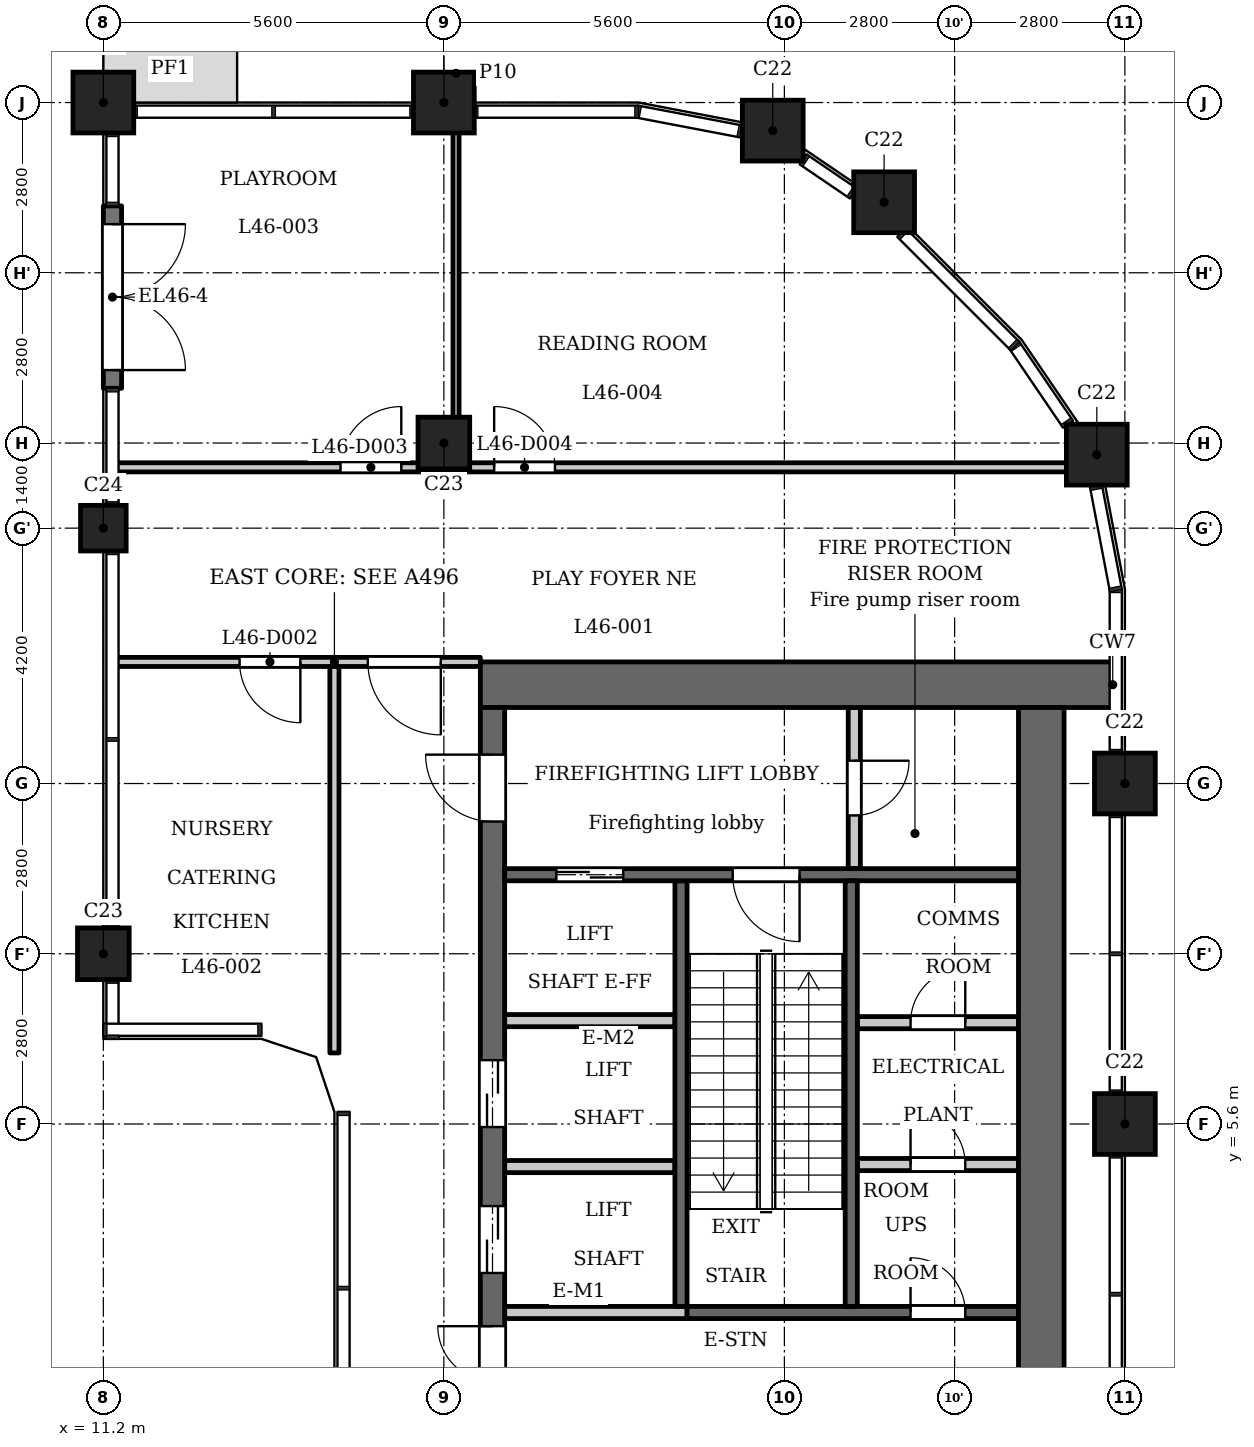
"""IFC4 building model, lengths in metres.
Left out: names, types, materials, properties, quantities, classifications, styles, units other than length and angle.
Written with IfcOpenShell. Run it as: python <this file> out.ifc"""

import sys

from ifc_helpers import new_model, si_unit, direction, frame, frame_2d, origin, origin_2d, place, context, subcontext, project, spatial, polyline, rectangle, outline, extrude, element, fill, save


model = new_model("IFC4")
c1 = context("Model", 3, precision=1e-05, world=origin(), true_north=direction((0.0, 1.0)))
c2 = subcontext(c1, "Body", "Model", "MODEL_VIEW")
j1 = project(units=[si_unit("LENGTHUNIT", "METRE"), si_unit("PLANEANGLEUNIT", "RADIAN")], contexts=[c1])
p1 = place(None, origin())
s1 = spatial("IfcSite", under=j1, at=p1, CompositionType="ELEMENT")
p2 = place(p1, origin())
s2 = spatial("IfcBuilding", under=s1, at=p2, CompositionType="ELEMENT")
p3 = place(p2, frame((0.0, 0.0, 178.1)))
s3 = spatial("IfcBuildingStorey", under=s2, at=p3, CompositionType="ELEMENT", Elevation=178.1)
for number, where, z_axis, x_axis in (
    (1, (28.0, 5.6, 0.0), (0.0, 0.0, 1.0), (1.0, 0.0, 0.0)),
    (2, (28.0, 11.2, 0.0), (0.0, 0.0, 1.0), (1.0, 0.0, 0.0)),
    (3, (27.538, 16.609, 0.0), (0.0, 0.0, 1.0), (1.0, 0.0, 0.0)),
    (4, (24.04, 20.76, 0.0), (0.0, 0.0, 1.0), (1.0, 0.0, 0.0)),
    (5, (22.209, 21.938, 0.0), (0.0, 0.0, 1.0), (1.0, 0.0, 0.0)),
    (6, (16.8, 22.4, 0.0), (0.0, 0.0, 1.0), (1.0, 0.0, 0.0)),
    (7, (11.2, 22.4, 0.0), (0.0, 0.0, 1.0), (1.0, 0.0, 0.0)),
):
    element("IfcColumn", number, at=place(p3, frame(where, z_axis=z_axis, x_axis=x_axis)), inside=s3, PredefinedType="COLUMN", context=c2, shape_type="SweptSolid", body=[
        extrude(rectangle(XDim=1.0, YDim=1.0, at=origin_2d()), origin(), (0.0, 0.0, 1.0), 5.4),
    ])
for number, where, z_axis, x_axis in (
    (8, (16.8, 16.8, 0.0), (0.0, 0.0, 1.0), (1.0, 0.0, 0.0)),
    (9, (11.2, 8.4, 0.0), (0.0, 0.0, 1.0), (1.0, 0.0, 0.0)),
):
    element("IfcColumn", number, at=place(p3, frame(where, z_axis=z_axis, x_axis=x_axis)), inside=s3, PredefinedType="COLUMN", context=c2, shape_type="SweptSolid", body=[
        extrude(rectangle(XDim=0.85, YDim=0.85, at=origin_2d()), origin(), (0.0, 0.0, 1.0), 5.4),
    ])
p4 = place(p3, frame((11.2, 15.4, 0.0), z_axis=(0.0, 0.0, 1.0), x_axis=(1.0, 0.0, 0.0)))
e10 = element("IfcColumn", 10, at=p4, inside=s3, PredefinedType="COLUMN", context=c2, shape_type="SweptSolid", body=[
    extrude(rectangle(XDim=0.75, YDim=0.75, at=origin_2d()), origin(), (0.0, 0.0, 1.0), 5.4),
])
p5 = place(p3, frame((11.35, 20.7, 0.0), z_axis=(0.0, 0.0, 1.0), x_axis=(0.0, -1.0, 0.0)))
e11 = element("IfcWall", 11, at=p5, inside=s3, PredefinedType="SOLIDWALL", context=c2, shape_type="SweptSolid", body=[
    extrude(rectangle(XDim=3.0, YDim=0.3, at=frame_2d((1.5, 0.0))), origin(), (0.0, 0.0, 1.0), 4.95),
])
p6 = place(p5, frame((0.3, 0.0, 0.0)))
e12 = element("IfcOpeningElement", 12, at=p6, cuts=e11, PredefinedType="OPENING", context=c2, shape_type="SweptSolid", body=[
    extrude(rectangle(XDim=2.4, YDim=2.3, at=frame_2d((1.2, 1.15))), frame((0.0, 0.16, 0.0), z_axis=(0.0, -1.0, 0.0), x_axis=(1.0, 0.0, 0.0)), (0.0, 0.0, 1.0), 0.32),
])
p7 = place(p3, frame((20.7, 2.6, 0.0), z_axis=(0.0, 0.0, 1.0), x_axis=(0.0, 1.0, 0.0)))
e13 = element("IfcWall", 13, at=p7, inside=s3, PredefinedType="SHEAR", context=c2, shape_type="SweptSolid", body=[
    extrude(rectangle(XDim=7.0, YDim=0.2, at=frame_2d((3.5, 0.0))), origin(), (0.0, 0.0, 1.0), 4.95),
])
p8 = place(p3, frame((20.8, 2.5, 0.0), z_axis=(0.0, 0.0, 1.0), x_axis=(1.0, 0.0, 0.0)))
e14 = element("IfcWall", 14, at=p8, inside=s3, PredefinedType="SHEAR", context=c2, shape_type="SweptSolid", body=[
    extrude(rectangle(XDim=5.45, YDim=0.2, at=frame_2d((2.725, 0.0))), origin(), (0.0, 0.0, 1.0), 4.95),
])
p9 = place(p8, frame((3.675, 0.0, 0.0)))
e15 = element("IfcOpeningElement", 15, at=p9, cuts=e14, PredefinedType="OPENING", context=c2, shape_type="SweptSolid", body=[
    extrude(rectangle(XDim=0.9, YDim=2.1, at=frame_2d((0.45, 1.05))), frame((0.0, 0.11, 0.0), z_axis=(0.0, -1.0, 0.0), x_axis=(1.0, 0.0, 0.0)), (0.0, 0.0, 1.0), 0.22),
])
p10 = place(p3, frame((17.4, 12.825, 0.0), z_axis=(0.0, 0.0, 1.0), x_axis=(1.0, 0.0, 0.0)))
e16 = element("IfcWall", 16, at=p10, inside=s3, PredefinedType="SHEAR", context=c2, shape_type="SweptSolid", body=[
    extrude(rectangle(XDim=10.4, YDim=0.75, at=frame_2d((5.2, 0.0))), origin(), (0.0, 0.0, 1.0), 4.95),
])
p11 = place(p3, frame((17.6, -12.45, 0.0), z_axis=(0.0, 0.0, 1.0), x_axis=(0.0, 1.0, 0.0)))
e17 = element("IfcWall", 17, at=p11, inside=s3, PredefinedType="SHEAR", context=c2, shape_type="SweptSolid", body=[
    extrude(rectangle(XDim=24.9, YDim=0.4, at=frame_2d((12.45, 0.0))), origin(), (0.0, 0.0, 1.0), 4.95),
])
p12 = place(p11, frame((6.85, 0.0, 0.0)))
e18 = element("IfcOpeningElement", 18, at=p12, cuts=e17, PredefinedType="OPENING", context=c2, shape_type="SweptSolid", body=[
    extrude(rectangle(XDim=0.9, YDim=2.1, at=frame_2d((0.45, 1.05))), frame((0.0, 0.21, 0.0), z_axis=(0.0, -1.0, 0.0), x_axis=(1.0, 0.0, 0.0)), (0.0, 0.0, 1.0), 0.42),
])
p13 = place(p11, frame((10.45, 0.0, 0.0)))
e19 = element("IfcOpeningElement", 19, at=p13, cuts=e17, PredefinedType="OPENING", context=c2, shape_type="SweptSolid", body=[
    extrude(rectangle(XDim=0.9, YDim=2.1, at=frame_2d((0.45, 1.05))), frame((0.0, 0.21, 0.0), z_axis=(0.0, -1.0, 0.0), x_axis=(1.0, 0.0, 0.0)), (0.0, 0.0, 1.0), 0.42),
])
p14 = place(p11, frame((15.6, 0.0, 0.0)))
e20 = element("IfcOpeningElement", 20, at=p14, cuts=e17, PredefinedType="OPENING", context=c2, shape_type="SweptSolid", body=[
    extrude(rectangle(XDim=1.1, YDim=2.1, at=frame_2d((0.55, 1.05))), frame((0.0, 0.21, 0.0), z_axis=(0.0, -1.0, 0.0), x_axis=(1.0, 0.0, 0.0)), (0.0, 0.0, 1.0), 0.42),
])
p15 = place(p11, frame((18.0, 0.0, 0.0)))
e21 = element("IfcOpeningElement", 21, at=p15, cuts=e17, PredefinedType="OPENING", context=c2, shape_type="SweptSolid", body=[
    extrude(rectangle(XDim=1.1, YDim=2.1, at=frame_2d((0.55, 1.05))), frame((0.0, 0.21, 0.0), z_axis=(0.0, -1.0, 0.0), x_axis=(1.0, 0.0, 0.0)), (0.0, 0.0, 1.0), 0.42),
])
p16 = place(p11, frame((23.025, 0.0, 0.0)))
e22 = element("IfcOpeningElement", 22, at=p16, cuts=e17, PredefinedType="OPENING", context=c2, shape_type="SweptSolid", body=[
    extrude(rectangle(XDim=1.1, YDim=2.1, at=frame_2d((0.55, 1.05))), frame((0.0, 0.21, 0.0), z_axis=(0.0, -1.0, 0.0), x_axis=(1.0, 0.0, 0.0)), (0.0, 0.0, 1.0), 0.42),
])
p17 = place(p11, frame((0.775, 0.0, 0.0)))
e23 = element("IfcOpeningElement", 23, at=p17, cuts=e17, PredefinedType="OPENING", context=c2, shape_type="SweptSolid", body=[
    extrude(rectangle(XDim=1.1, YDim=2.1, at=frame_2d((0.55, 1.05))), frame((0.0, 0.21, 0.0), z_axis=(0.0, -1.0, 0.0), x_axis=(1.0, 0.0, 0.0)), (0.0, 0.0, 1.0), 0.42),
])
p18 = place(p11, frame((12.925, 0.0, 0.0)))
e24 = element("IfcOpeningElement", 24, at=p18, cuts=e17, PredefinedType="OPENING", context=c2, shape_type="SweptSolid", body=[
    extrude(rectangle(XDim=1.8, YDim=2.1, at=frame_2d((0.9, 1.05))), frame((0.0, 0.21, 0.0), z_axis=(0.0, -1.0, 0.0), x_axis=(1.0, 0.0, 0.0)), (0.0, 0.0, 1.0), 0.42),
])
p19 = place(p3, frame((26.625, -12.45, 0.0), z_axis=(0.0, 0.0, 1.0), x_axis=(0.0, 1.0, 0.0)))
e25 = element("IfcWall", 25, at=p19, inside=s3, PredefinedType="SHEAR", context=c2, shape_type="SweptSolid", body=[
    extrude(rectangle(XDim=24.9, YDim=0.75, at=frame_2d((12.45, 0.0))), origin(), (0.0, 0.0, 1.0), 4.95),
])
p20 = place(p3, frame((23.55, 9.8, 0.0), z_axis=(0.0, 0.0, 1.0), x_axis=(0.0, 1.0, 0.0)))
e26 = element("IfcWall", 26, at=p20, inside=s3, PredefinedType="PARTITIONING", context=c2, shape_type="SweptSolid", body=[
    extrude(rectangle(XDim=2.65, YDim=0.2, at=frame_2d((1.325, 0.0))), origin(), (0.0, 0.0, 1.0), 4.95),
])
p21 = place(p20, frame((0.875, 0.0, 0.0)))
e27 = element("IfcOpeningElement", 27, at=p21, cuts=e26, PredefinedType="OPENING", context=c2, shape_type="SweptSolid", body=[
    extrude(rectangle(XDim=0.9, YDim=2.1, at=frame_2d((0.45, 1.05))), frame((0.0, 0.11, 0.0), z_axis=(0.0, -1.0, 0.0), x_axis=(1.0, 0.0, 0.0)), (0.0, 0.0, 1.0), 0.22),
])
p22 = place(p3, frame((23.6, 4.933, 0.0), z_axis=(0.0, 0.0, 1.0), x_axis=(1.0, 0.0, 0.0)))
e28 = element("IfcWall", 28, at=p22, inside=s3, PredefinedType="PARTITIONING", context=c2, shape_type="SweptSolid", body=[
    extrude(rectangle(XDim=2.65, YDim=0.2, at=frame_2d((1.325, 0.0))), origin(), (0.0, 0.0, 1.0), 4.95),
])
p23 = place(p22, frame((0.875, 0.0, 0.0)))
e29 = element("IfcOpeningElement", 29, at=p23, cuts=e28, PredefinedType="OPENING", context=c2, shape_type="SweptSolid", body=[
    extrude(rectangle(XDim=0.9, YDim=2.1, at=frame_2d((0.45, 1.05))), frame((0.0, 0.11, 0.0), z_axis=(0.0, -1.0, 0.0), x_axis=(1.0, 0.0, 0.0)), (0.0, 0.0, 1.0), 0.22),
])
p24 = place(p3, frame((23.6, 7.267, 0.0), z_axis=(0.0, 0.0, 1.0), x_axis=(1.0, 0.0, 0.0)))
e30 = element("IfcWall", 30, at=p24, inside=s3, PredefinedType="PARTITIONING", context=c2, shape_type="SweptSolid", body=[
    extrude(rectangle(XDim=2.65, YDim=0.2, at=frame_2d((1.325, 0.0))), origin(), (0.0, 0.0, 1.0), 4.95),
])
p25 = place(p24, frame((0.875, 0.0, 0.0)))
e31 = element("IfcOpeningElement", 31, at=p25, cuts=e30, PredefinedType="OPENING", context=c2, shape_type="SweptSolid", body=[
    extrude(rectangle(XDim=0.9, YDim=2.1, at=frame_2d((0.45, 1.05))), frame((0.0, 0.11, 0.0), z_axis=(0.0, -1.0, 0.0), x_axis=(1.0, 0.0, 0.0)), (0.0, 0.0, 1.0), 0.22),
])
p26 = place(p3, frame((17.8, 2.5, 0.0), z_axis=(0.0, 0.0, 1.0), x_axis=(1.0, 0.0, 0.0)))
e32 = element("IfcWall", 32, at=p26, inside=s3, PredefinedType="PARTITIONING", context=c2, shape_type="SweptSolid", body=[
    extrude(rectangle(XDim=3.0, YDim=0.2, at=frame_2d((1.5, 0.0))), origin(), (0.0, 0.0, 1.0), 4.95),
])
for number, where, z_axis, x_axis in (
    (33, (17.8, 4.9, 0.0), (0.0, 0.0, 1.0), (1.0, 0.0, 0.0)),
    (34, (17.8, 7.3, 0.0), (0.0, 0.0, 1.0), (1.0, 0.0, 0.0)),
):
    element("IfcWall", number, at=place(p3, frame(where, z_axis=z_axis, x_axis=x_axis)), inside=s3, PredefinedType="PARTITIONING", context=c2, shape_type="SweptSolid", body=[
        extrude(rectangle(XDim=2.8, YDim=0.2, at=frame_2d((1.4, 0.0))), origin(), (0.0, 0.0, 1.0), 4.95),
    ])
p27 = place(p3, frame((17.8, 9.7, 0.0), z_axis=(0.0, 0.0, 1.0), x_axis=(1.0, 0.0, 0.0)))
e35 = element("IfcWall", 35, at=p27, inside=s3, PredefinedType="SHEAR", context=c2, shape_type="SweptSolid", body=[
    extrude(rectangle(XDim=8.45, YDim=0.2, at=frame_2d((4.225, 0.0))), origin(), (0.0, 0.0, 1.0), 4.95),
])
p28 = place(p27, frame((0.85, 0.0, 0.0)))
e36 = element("IfcOpeningElement", 36, at=p28, cuts=e35, PredefinedType="OPENING", context=c2, shape_type="SweptSolid", body=[
    extrude(rectangle(XDim=1.1, YDim=2.1, at=frame_2d((0.55, 1.05))), frame((0.0, 0.11, 0.0), z_axis=(0.0, -1.0, 0.0), x_axis=(1.0, 0.0, 0.0)), (0.0, 0.0, 1.0), 0.22),
])
p29 = place(p27, frame((3.75, 0.0, 0.0)))
e37 = element("IfcOpeningElement", 37, at=p29, cuts=e35, PredefinedType="OPENING", context=c2, shape_type="SweptSolid", body=[
    extrude(rectangle(XDim=1.1, YDim=2.1, at=frame_2d((0.55, 1.05))), frame((0.0, 0.11, 0.0), z_axis=(0.0, -1.0, 0.0), x_axis=(1.0, 0.0, 0.0)), (0.0, 0.0, 1.0), 0.22),
])
p30 = place(p3, frame((23.5, 2.6, 0.0), z_axis=(0.0, 0.0, 1.0), x_axis=(0.0, 1.0, 0.0)))
e38 = element("IfcWall", 38, at=p30, inside=s3, PredefinedType="SHEAR", context=c2, shape_type="SweptSolid", body=[
    extrude(rectangle(XDim=7.0, YDim=0.2, at=frame_2d((3.5, 0.0))), origin(), (0.0, 0.0, 1.0), 4.95),
])
p31 = place(p3, frame((11.384, 13.2, 0.0), z_axis=(0.0, 0.0, 1.0), x_axis=(1.0, 0.0, 0.0)))
e39 = element("IfcWall", 39, at=p31, inside=s3, PredefinedType="PARTITIONING", context=c2, shape_type="SweptSolid", body=[
    extrude(rectangle(XDim=6.016, YDim=0.15, at=frame_2d((3.008, 0.0))), origin(), (0.0, 0.0, 1.0), 4.95),
])
p32 = place(p31, frame((4.166, 0.0, 0.0)))
e40 = element("IfcOpeningElement", 40, at=p32, cuts=e39, PredefinedType="OPENING", context=c2, shape_type="SweptSolid", body=[
    extrude(rectangle(XDim=1.2, YDim=2.1, at=frame_2d((0.6, 1.05))), frame((0.0, 0.085, 0.0), z_axis=(0.0, -1.0, 0.0), x_axis=(1.0, 0.0, 0.0)), (0.0, 0.0, 1.0), 0.17),
])
p33 = place(p31, frame((2.056, 0.0, 0.0)))
e41 = element("IfcOpeningElement", 41, at=p33, cuts=e39, PredefinedType="OPENING", context=c2, shape_type="SweptSolid", body=[
    extrude(rectangle(XDim=1.0, YDim=2.1, at=frame_2d((0.5, 1.05))), frame((0.0, 0.085, 0.0), z_axis=(0.0, -1.0, 0.0), x_axis=(1.0, 0.0, 0.0)), (0.0, 0.0, 1.0), 0.17),
])
p34 = place(p3, frame((11.384, 16.4, 0.0), z_axis=(0.0, 0.0, 1.0), x_axis=(1.0, 0.0, 0.0)))
e42 = element("IfcWall", 42, at=p34, inside=s3, PredefinedType="PARTITIONING", context=c2, shape_type="SweptSolid", body=[
    extrude(rectangle(XDim=16.136, YDim=0.15, at=frame_2d((8.068, 0.0))), origin(), (0.0, 0.0, 1.0), 4.95),
])
p35 = place(p34, frame((3.716, 0.0, 0.0)))
e43 = element("IfcOpeningElement", 43, at=p35, cuts=e42, PredefinedType="OPENING", context=c2, shape_type="SweptSolid", body=[
    extrude(rectangle(XDim=1.0, YDim=2.1, at=frame_2d((0.5, 1.05))), frame((0.0, 0.085, 0.0), z_axis=(0.0, -1.0, 0.0), x_axis=(1.0, 0.0, 0.0)), (0.0, 0.0, 1.0), 0.17),
])
p36 = place(p34, frame((6.243, 0.0, 0.0)))
e44 = element("IfcOpeningElement", 44, at=p36, cuts=e42, PredefinedType="OPENING", context=c2, shape_type="SweptSolid", body=[
    extrude(rectangle(XDim=1.0, YDim=2.1, at=frame_2d((0.5, 1.05))), frame((0.0, 0.085, 0.0), z_axis=(0.0, -1.0, 0.0), x_axis=(1.0, 0.0, 0.0)), (0.0, 0.0, 1.0), 0.17),
])
p37 = place(p3, frame((15.0, 6.769, 0.0), z_axis=(0.0, 0.0, 1.0), x_axis=(0.0, 1.0, 0.0)))
e45 = element("IfcWall", 45, at=p37, inside=s3, PredefinedType="PARTITIONING", context=c2, shape_type="SweptSolid", body=[
    extrude(rectangle(XDim=6.356, YDim=0.15, at=frame_2d((3.178, 0.0))), origin(), (0.0, 0.0, 1.0), 4.95),
])
p38 = place(p3, frame((17.0, 16.475, 0.0), z_axis=(0.0, 0.0, 1.0), x_axis=(0.0, 1.0, 0.0)))
e46 = element("IfcWall", 46, at=p38, inside=s3, PredefinedType="PARTITIONING", context=c2, shape_type="SweptSolid", body=[
    extrude(rectangle(XDim=6.405, YDim=0.1, at=frame_2d((3.202, 0.0))), origin(), (0.0, 0.0, 1.0), 4.95),
])
p39 = place(p3, origin())
e47 = element("IfcWall", 47, at=p39, inside=s3, PredefinedType="SOLIDWALL", context=c2, shape_type="SweptSolid", body=[
    extrude(outline(polyline([(13.8, 7.0), (14.7, 6.7), (15.0, 5.8), (15.3, 5.8), (15.3, 5.849), (14.937, 6.937), (13.849, 7.3), (13.8, 7.3), (13.8, 7.0)])), origin(), (0.0, 0.0, 1.0), 4.95),
])
p40 = place(p6, origin())
e48 = element("IfcDoor", 48, at=p40, inside=s3, OperationType="SINGLE_SWING_LEFT", PredefinedType="DOOR", context=c2, shape_type="SweptSolid", body=[
    extrude(rectangle(XDim=2.4, YDim=2.3, at=frame_2d((1.2, 1.15))), frame((0.0, 0.025, 0.0), z_axis=(0.0, -1.0, 0.0), x_axis=(1.0, 0.0, 0.0)), (0.0, 0.0, 1.0), 0.05),
])
fill(e12, e48)
p41 = place(p14, origin())
e49 = element("IfcDoor", 49, at=p41, inside=s3, OperationType="DOUBLE_DOOR_SLIDING", PredefinedType="DOOR", context=c2, shape_type="SweptSolid", body=[
    extrude(rectangle(XDim=1.1, YDim=2.1, at=frame_2d((0.55, 1.05))), frame((0.0, 0.025, 0.0), z_axis=(0.0, -1.0, 0.0), x_axis=(1.0, 0.0, 0.0)), (0.0, 0.0, 1.0), 0.05),
])
fill(e20, e49)
p42 = place(p15, origin())
e50 = element("IfcDoor", 50, at=p42, inside=s3, OperationType="DOUBLE_DOOR_SLIDING", PredefinedType="DOOR", context=c2, shape_type="SweptSolid", body=[
    extrude(rectangle(XDim=1.1, YDim=2.1, at=frame_2d((0.55, 1.05))), frame((0.0, 0.025, 0.0), z_axis=(0.0, -1.0, 0.0), x_axis=(1.0, 0.0, 0.0)), (0.0, 0.0, 1.0), 0.05),
])
fill(e21, e50)
p43 = place(p28, origin())
e51 = element("IfcDoor", 51, at=p43, inside=s3, OperationType="DOUBLE_DOOR_SLIDING", PredefinedType="DOOR", context=c2, shape_type="SweptSolid", body=[
    extrude(rectangle(XDim=1.1, YDim=2.1, at=frame_2d((0.55, 1.05))), frame((0.0, 0.025, 0.0), z_axis=(0.0, -1.0, 0.0), x_axis=(1.0, 0.0, 0.0)), (0.0, 0.0, 1.0), 0.05),
])
fill(e36, e51)
p44 = place(p16, origin())
e52 = element("IfcDoor", 52, at=p44, inside=s3, OperationType="SINGLE_SWING_LEFT", PredefinedType="DOOR", context=c2, shape_type="SweptSolid", body=[
    extrude(rectangle(XDim=1.1, YDim=2.1, at=frame_2d((0.55, 1.05))), frame((0.0, 0.025, 0.0), z_axis=(0.0, -1.0, 0.0), x_axis=(1.0, 0.0, 0.0)), (0.0, 0.0, 1.0), 0.05),
])
fill(e22, e52)
p45 = place(p21, origin())
e53 = element("IfcDoor", 53, at=p45, inside=s3, OperationType="SINGLE_SWING_RIGHT", PredefinedType="DOOR", context=c2, shape_type="SweptSolid", body=[
    extrude(rectangle(XDim=0.9, YDim=2.1, at=frame_2d((0.45, 1.05))), frame((0.0, 0.025, 0.0), z_axis=(0.0, -1.0, 0.0), x_axis=(1.0, 0.0, 0.0)), (0.0, 0.0, 1.0), 0.05),
])
fill(e27, e53)
p46 = place(p29, origin())
e54 = element("IfcDoor", 54, at=p46, inside=s3, OperationType="SINGLE_SWING_RIGHT", PredefinedType="DOOR", context=c2, shape_type="SweptSolid", body=[
    extrude(rectangle(XDim=1.1, YDim=2.1, at=frame_2d((0.55, 1.05))), frame((0.0, 0.025, 0.0), z_axis=(0.0, -1.0, 0.0), x_axis=(1.0, 0.0, 0.0)), (0.0, 0.0, 1.0), 0.05),
])
fill(e37, e54)
p47 = place(p18, origin())
e55 = element("IfcDoor", 55, at=p47, inside=s3, OperationType="DOUBLE_DOOR_SINGLE_SWING", PredefinedType="DOOR", context=c2, shape_type="SweptSolid", body=[
    extrude(rectangle(XDim=1.8, YDim=2.1, at=frame_2d((0.9, 1.05))), frame((0.0, 0.025, 0.0), z_axis=(0.0, -1.0, 0.0), x_axis=(1.0, 0.0, 0.0)), (0.0, 0.0, 1.0), 0.05),
])
fill(e24, e55)
p48 = place(p23, origin())
e56 = element("IfcDoor", 56, at=p48, inside=s3, OperationType="SINGLE_SWING_RIGHT", PredefinedType="DOOR", context=c2, shape_type="SweptSolid", body=[
    extrude(rectangle(XDim=0.9, YDim=2.1, at=frame_2d((0.45, 1.05))), frame((0.0, 0.025, 0.0), z_axis=(0.0, -1.0, 0.0), x_axis=(1.0, 0.0, 0.0)), (0.0, 0.0, 1.0), 0.05),
])
fill(e29, e56)
p49 = place(p25, origin())
e57 = element("IfcDoor", 57, at=p49, inside=s3, OperationType="SINGLE_SWING_LEFT", PredefinedType="DOOR", context=c2, shape_type="SweptSolid", body=[
    extrude(rectangle(XDim=0.9, YDim=2.1, at=frame_2d((0.45, 1.05))), frame((0.0, 0.025, 0.0), z_axis=(0.0, -1.0, 0.0), x_axis=(1.0, 0.0, 0.0)), (0.0, 0.0, 1.0), 0.05),
])
fill(e31, e57)
p50 = place(p9, origin())
e58 = element("IfcDoor", 58, at=p50, inside=s3, OperationType="SINGLE_SWING_RIGHT", PredefinedType="DOOR", context=c2, shape_type="SweptSolid", body=[
    extrude(rectangle(XDim=0.9, YDim=2.1, at=frame_2d((0.45, 1.05))), frame((0.0, 0.025, 0.0), z_axis=(0.0, -1.0, 0.0), x_axis=(1.0, 0.0, 0.0)), (0.0, 0.0, 1.0), 0.05),
])
fill(e15, e58)
p51 = place(p32, origin())
e59 = element("IfcDoor", 59, at=p51, inside=s3, OperationType="SINGLE_SWING_RIGHT", PredefinedType="DOOR", context=c2, shape_type="SweptSolid", body=[
    extrude(rectangle(XDim=1.2, YDim=2.1, at=frame_2d((0.6, 1.05))), frame((0.0, 0.025, 0.0), z_axis=(0.0, -1.0, 0.0), x_axis=(1.0, 0.0, 0.0)), (0.0, 0.0, 1.0), 0.05),
])
fill(e40, e59)
p52 = place(p33, origin())
e60 = element("IfcDoor", 60, at=p52, inside=s3, OperationType="SINGLE_SWING_RIGHT", PredefinedType="DOOR", context=c2, shape_type="SweptSolid", body=[
    extrude(rectangle(XDim=1.0, YDim=2.1, at=frame_2d((0.5, 1.05))), frame((0.0, 0.025, 0.0), z_axis=(0.0, -1.0, 0.0), x_axis=(1.0, 0.0, 0.0)), (0.0, 0.0, 1.0), 0.05),
])
fill(e41, e60)
p53 = place(p35, origin())
e61 = element("IfcDoor", 61, at=p53, inside=s3, OperationType="SINGLE_SWING_LEFT", PredefinedType="DOOR", context=c2, shape_type="SweptSolid", body=[
    extrude(rectangle(XDim=1.0, YDim=2.1, at=frame_2d((0.5, 1.05))), frame((0.0, 0.025, 0.0), z_axis=(0.0, -1.0, 0.0), x_axis=(1.0, 0.0, 0.0)), (0.0, 0.0, 1.0), 0.05),
])
fill(e43, e61)
p54 = place(p36, origin())
e62 = element("IfcDoor", 62, at=p54, inside=s3, OperationType="SINGLE_SWING_RIGHT", PredefinedType="DOOR", context=c2, shape_type="SweptSolid", body=[
    extrude(rectangle(XDim=1.0, YDim=2.1, at=frame_2d((0.5, 1.05))), frame((0.0, 0.025, 0.0), z_axis=(0.0, -1.0, 0.0), x_axis=(1.0, 0.0, 0.0)), (0.0, 0.0, 1.0), 0.05),
])
fill(e44, e62)
save(model, sys.argv[1])
